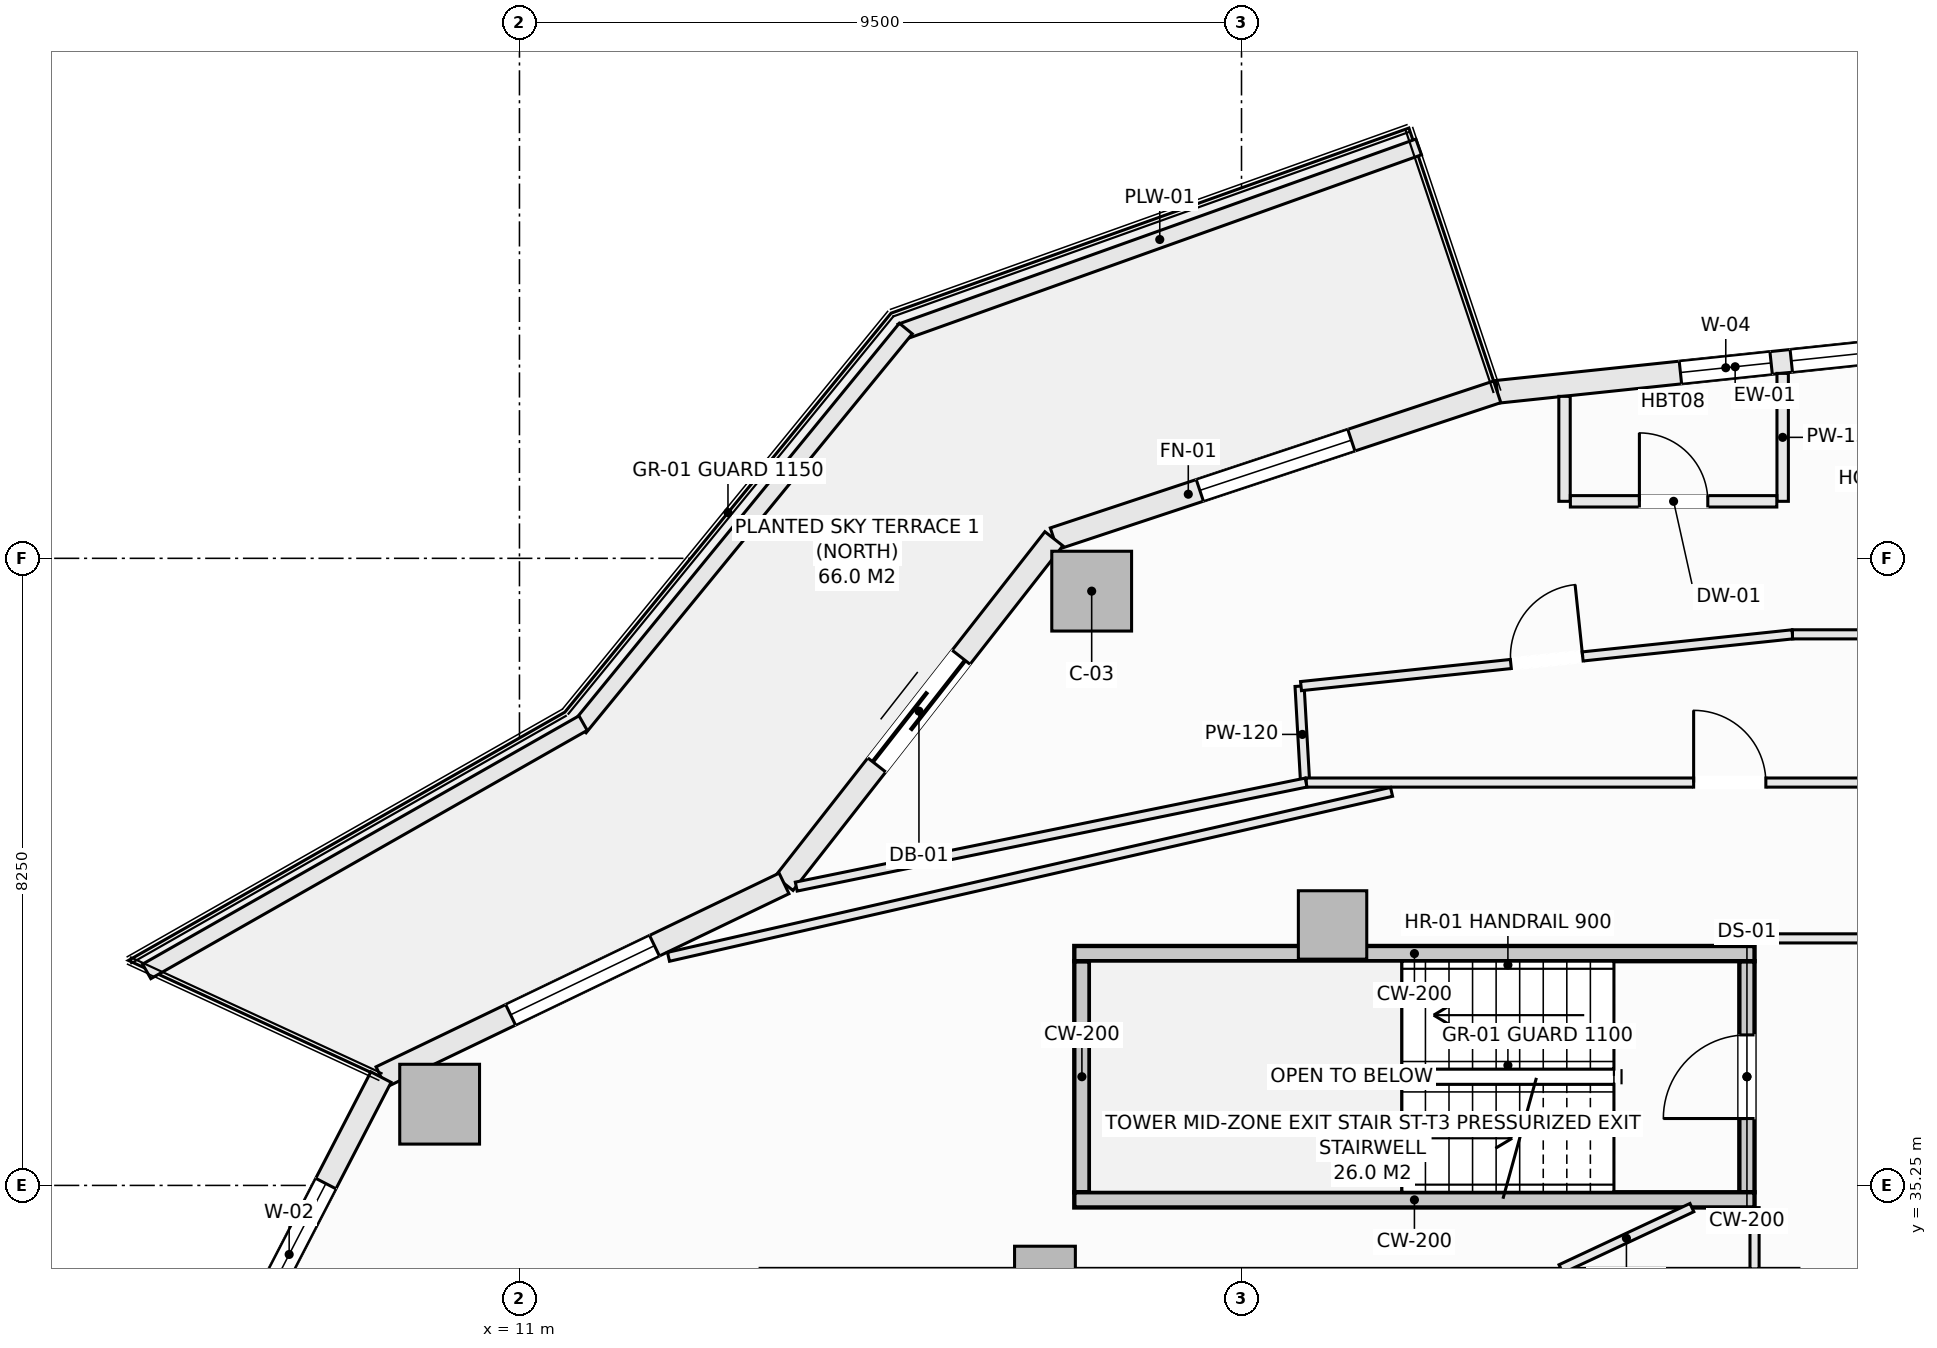
"""IFC4 building model, lengths in metres.
Left out: names, types, materials, properties, quantities, classifications, styles, units other than length and angle.
Written with IfcOpenShell. Run it as: python <this file> out.ifc"""

import sys

from ifc_helpers import new_model, si_unit, direction, frame, frame_2d, origin, origin_2d, place, context, subcontext, project, spatial, rectangle, extrude, element, fill, save


model = new_model("IFC4")
c1 = context("Model", 3, precision=1e-05, world=origin(), true_north=direction((0.0, 1.0)))
c2 = subcontext(c1, "Body", "Model", "MODEL_VIEW")
j1 = project(units=[si_unit("LENGTHUNIT", "METRE"), si_unit("PLANEANGLEUNIT", "RADIAN")], contexts=[c1])
p1 = place(None, origin())
s1 = spatial("IfcSite", under=j1, at=p1, CompositionType="ELEMENT")
p2 = place(p1, origin())
s2 = spatial("IfcBuilding", under=s1, at=p2, CompositionType="ELEMENT")
p3 = place(p2, frame((0.0, 0.0, 118.9)))
s3 = spatial("IfcBuildingStorey", under=s2, at=p3, CompositionType="ELEMENT", Elevation=118.9)
for number, where, z_axis, x_axis in (
    (1, (18.529, 43.068, -0.27), (0.0, 0.0, 1.0), (1.0, 0.0, 0.0)),
    (2, (9.95, 36.319, -0.27), (0.0, 0.0, 1.0), (1.0, 0.0, 0.0)),
):
    element("IfcColumn", number, at=place(p3, frame(where, z_axis=z_axis, x_axis=x_axis)), inside=s3, PredefinedType="COLUMN", context=c2, shape_type="SweptSolid", body=[
        extrude(rectangle(XDim=1.05, YDim=1.05, at=origin_2d()), origin(), (0.0, 0.0, 1.0), 3.4),
    ])
p4 = place(p3, frame((21.698, 38.677, -0.27), z_axis=(0.0, 0.0, 1.0), x_axis=(1.0, 0.0, 0.0)))
e3 = element("IfcColumn", 3, at=p4, inside=s3, PredefinedType="COLUMN", context=c2, shape_type="SweptSolid", body=[
    extrude(rectangle(XDim=0.9, YDim=0.9, at=origin_2d()), origin(), (0.0, 0.0, 1.0), 3.4),
])
p5 = place(p3, frame((17.914, 34.05, -0.27), z_axis=(0.0, 0.0, 1.0), x_axis=(1.0, 0.0, 0.0)))
e4 = element("IfcColumn", 4, at=p5, inside=s3, PredefinedType="PILASTER", context=c2, shape_type="SweptSolid", body=[
    extrude(rectangle(XDim=0.8, YDim=0.8, at=origin_2d()), origin(), (0.0, 0.0, 1.0), 3.4),
])
p6 = place(p3, frame((23.865, 45.691, 0.0), z_axis=(0.0, 0.0, 1.0), x_axis=(0.994498012394, 0.104755445421, 0.0)))
e5 = element("IfcWall", 5, at=p6, inside=s3, PredefinedType="SOLIDWALL", context=c2, shape_type="SweptSolid", body=[
    extrude(rectangle(XDim=6.295, YDim=0.3, at=frame_2d((3.147, 0.0))), origin(), (0.0, 0.0, 1.0), 2.653),
])
p7 = place(p6, frame((2.423, 0.0, 0.74)))
e6 = element("IfcOpeningElement", 6, at=p7, cuts=e5, PredefinedType="OPENING", context=c2, shape_type="SweptSolid", body=[
    extrude(rectangle(XDim=1.2, YDim=1.7, at=frame_2d((0.6, 0.85))), frame((0.0, 0.16, 0.0), z_axis=(0.0, -1.0, 0.0), x_axis=(1.0, 0.0, 0.0)), (0.0, 0.0, 1.0), 0.32),
])
p8 = place(p6, frame((3.89, 0.0, 0.74)))
e7 = element("IfcOpeningElement", 7, at=p8, cuts=e5, PredefinedType="OPENING", context=c2, shape_type="SweptSolid", body=[
    extrude(rectangle(XDim=1.2, YDim=1.7, at=frame_2d((0.6, 0.85))), frame((0.0, 0.16, 0.0), z_axis=(0.0, -1.0, 0.0), x_axis=(1.0, 0.0, 0.0)), (0.0, 0.0, 1.0), 0.32),
])
p9 = place(p3, frame((18.031, 43.758, 0.0), z_axis=(0.0, 0.0, 1.0), x_axis=(0.949238009374, 0.314558741032, 0.0)))
e8 = element("IfcWall", 8, at=p9, inside=s3, PredefinedType="SOLIDWALL", context=c2, shape_type="SweptSolid", body=[
    extrude(rectangle(XDim=6.146, YDim=0.3, at=frame_2d((3.073, 0.0))), origin(), (0.0, 0.0, 1.0), 2.653),
])
p10 = place(p9, frame((2.023, 0.0, 0.74)))
e9 = element("IfcOpeningElement", 9, at=p10, cuts=e8, PredefinedType="OPENING", context=c2, shape_type="SweptSolid", body=[
    extrude(rectangle(XDim=2.1, YDim=1.7, at=frame_2d((1.05, 0.85))), frame((0.0, 0.16, 0.0), z_axis=(0.0, -1.0, 0.0), x_axis=(1.0, 0.0, 0.0)), (0.0, 0.0, 1.0), 0.32),
])
p11 = place(p3, frame((14.481, 39.223, 0.0), z_axis=(0.0, 0.0, 1.0), x_axis=(0.616435134162, 0.787405693001, 0.0)))
e10 = element("IfcWall", 10, at=p11, inside=s3, PredefinedType="SOLIDWALL", context=c2, shape_type="SweptSolid", body=[
    extrude(rectangle(XDim=5.759, YDim=0.3, at=frame_2d((2.879, 0.0))), origin(), (0.0, 0.0, 1.0), 2.653),
])
p12 = place(p11, frame((1.979, 0.0, 0.0)))
e11 = element("IfcOpeningElement", 11, at=p12, cuts=e10, PredefinedType="OPENING", context=c2, shape_type="SweptSolid", body=[
    extrude(rectangle(XDim=1.8, YDim=2.25, at=frame_2d((0.9, 1.125))), frame((0.0, 0.16, 0.0), z_axis=(0.0, -1.0, 0.0), x_axis=(1.0, 0.0, 0.0)), (0.0, 0.0, 1.0), 0.32),
])
p13 = place(p3, frame((9.178, 36.675, 0.0), z_axis=(0.0, 0.0, 1.0), x_axis=(0.901370184739, 0.433049408339, 0.0)))
e12 = element("IfcWall", 12, at=p13, inside=s3, PredefinedType="SOLIDWALL", context=c2, shape_type="SweptSolid", body=[
    extrude(rectangle(XDim=5.884, YDim=0.3, at=frame_2d((2.942, 0.0))), origin(), (0.0, 0.0, 1.0), 2.653),
])
p14 = place(p13, frame((1.892, 0.0, 0.74)))
e13 = element("IfcOpeningElement", 13, at=p14, cuts=e12, PredefinedType="OPENING", context=c2, shape_type="SweptSolid", body=[
    extrude(rectangle(XDim=2.1, YDim=1.7, at=frame_2d((1.05, 0.85))), frame((0.0, 0.16, 0.0), z_axis=(0.0, -1.0, 0.0), x_axis=(1.0, 0.0, 0.0)), (0.0, 0.0, 1.0), 0.32),
])
p15 = place(p3, frame((6.762, 32.008, 0.0), z_axis=(0.0, 0.0, 1.0), x_axis=(0.459767899643, 0.888039119892, 0.0)))
e14 = element("IfcWall", 14, at=p15, inside=s3, PredefinedType="SOLIDWALL", context=c2, shape_type="SweptSolid", body=[
    extrude(rectangle(XDim=5.255, YDim=0.3, at=frame_2d((2.628, 0.0))), origin(), (0.0, 0.0, 1.0), 2.653),
])
p16 = place(p15, frame((1.578, 0.0, 0.74)))
e15 = element("IfcOpeningElement", 15, at=p16, cuts=e14, PredefinedType="OPENING", context=c2, shape_type="SweptSolid", body=[
    extrude(rectangle(XDim=2.1, YDim=1.7, at=frame_2d((1.05, 0.85))), frame((0.0, 0.16, 0.0), z_axis=(0.0, -1.0, 0.0), x_axis=(1.0, 0.0, 0.0)), (0.0, 0.0, 1.0), 0.32),
])
p17 = place(p3, frame((16.018, 46.477, 0.0), z_axis=(0.0, 0.0, 1.0), x_axis=(0.941628873241, 0.336652736627, 0.0)))
e16 = element("IfcWall", 16, at=p17, inside=s3, PredefinedType="PARAPET", context=c2, shape_type="SweptSolid", body=[
    extrude(rectangle(XDim=7.235, YDim=0.22, at=frame_2d((3.618, 0.0))), origin(), (0.0, 0.0, 1.0), 0.52),
])
p18 = place(p3, frame((11.791, 41.274, 0.0), z_axis=(0.0, 0.0, 1.0), x_axis=(0.633024046468, 0.774132131224, 0.0)))
e17 = element("IfcWall", 17, at=p18, inside=s3, PredefinedType="PARAPET", context=c2, shape_type="SweptSolid", body=[
    extrude(rectangle(XDim=6.781, YDim=0.22, at=frame_2d((3.39, 0.0))), origin(), (0.0, 0.0, 1.0), 0.52),
])
p19 = place(p3, frame((6.095, 38.066, 0.0), z_axis=(0.0, 0.0, 1.0), x_axis=(0.869187658335, 0.494482370361, 0.0)))
e18 = element("IfcWall", 18, at=p19, inside=s3, PredefinedType="PARAPET", context=c2, shape_type="SweptSolid", body=[
    extrude(rectangle(XDim=6.606, YDim=0.22, at=frame_2d((3.303, 0.0))), origin(), (0.0, 0.0, 1.0), 0.52),
])
p20 = place(p3, frame((27.15, 35.16, -0.27), z_axis=(0.0, 0.0, 1.0), x_axis=(0.0, 1.0, 0.0)))
e19 = element("IfcWall", 19, at=p20, inside=s3, PredefinedType="SHEAR", context=c2, shape_type="SweptSolid", body=[
    extrude(rectangle(XDim=3.04, YDim=0.2, at=frame_2d((1.52, 0.0))), origin(), (0.0, 0.0, 1.0), 3.4),
])
p21 = place(p20, frame((0.97, 0.0, 0.27)))
e20 = element("IfcOpeningElement", 20, at=p21, cuts=e19, PredefinedType="OPENING", context=c2, shape_type="SweptSolid", body=[
    extrude(rectangle(XDim=1.1, YDim=2.15, at=frame_2d((0.55, 1.075))), frame((0.0, 0.11, 0.0), z_axis=(0.0, -1.0, 0.0), x_axis=(1.0, 0.0, 0.0)), (0.0, 0.0, 1.0), 0.22),
])
p22 = place(p3, frame((18.4, 35.16, -0.27), z_axis=(0.0, 0.0, 1.0), x_axis=(0.0, 1.0, 0.0)))
e21 = element("IfcWall", 21, at=p22, inside=s3, PredefinedType="SHEAR", context=c2, shape_type="SweptSolid", body=[
    extrude(rectangle(XDim=3.04, YDim=0.2, at=frame_2d((1.52, 0.0))), origin(), (0.0, 0.0, 1.0), 3.4),
])
for number, where, z_axis, x_axis in (
    (22, (18.3, 38.3, -0.27), (0.0, 0.0, 1.0), (1.0, 0.0, 0.0)),
    (23, (18.3, 35.06, -0.27), (0.0, 0.0, 1.0), (1.0, 0.0, 0.0)),
):
    element("IfcWall", number, at=place(p3, frame(where, z_axis=z_axis, x_axis=x_axis)), inside=s3, PredefinedType="SHEAR", context=c2, shape_type="SweptSolid", body=[
        extrude(rectangle(XDim=8.95, YDim=0.2, at=frame_2d((4.475, 0.0))), origin(), (0.0, 0.0, 1.0), 3.4),
    ])
p23 = place(p3, frame((27.62, 44.25, 0.0), z_axis=(0.0, 0.0, 1.0), x_axis=(0.0, 1.0, 0.0)))
e24 = element("IfcWall", 24, at=p23, inside=s3, PredefinedType="PARTITIONING", context=c2, shape_type="SweptSolid", body=[
    extrude(rectangle(XDim=1.683, YDim=0.15, at=frame_2d((0.842, 0.0))), origin(), (0.0, 0.0, 1.0), 3.13),
])
p24 = place(p3, frame((21.264, 41.818, 0.0), z_axis=(0.0, 0.0, 1.0), x_axis=(0.0574492264, -0.99834842935, 0.0)))
e25 = element("IfcWall", 25, at=p24, inside=s3, PredefinedType="PARTITIONING", context=c2, shape_type="SweptSolid", body=[
    extrude(rectangle(XDim=1.271, YDim=0.12, at=frame_2d((0.635, 0.0))), origin(), (0.0, 0.0, 1.0), 3.13),
])
p25 = place(p3, frame((27.25, 34.152, 0.0), z_axis=(0.0, 0.0, 1.0), x_axis=(0.0, 1.0, 0.0)))
e26 = element("IfcWall", 26, at=p25, inside=s3, PredefinedType="PARTITIONING", context=c2, shape_type="SweptSolid", body=[
    extrude(rectangle(XDim=0.806, YDim=0.12, at=frame_2d((0.403, 0.0))), origin(), (0.0, 0.0, 1.0), 3.13),
])
p26 = place(p3, frame((27.25, 38.5, 0.0), z_axis=(0.0, 0.0, 1.0), x_axis=(1.0, 0.0, 0.0)))
e27 = element("IfcWall", 27, at=p26, inside=s3, PredefinedType="PARTITIONING", context=c2, shape_type="SweptSolid", body=[
    extrude(rectangle(XDim=2.53, YDim=0.12, at=frame_2d((1.265, 0.0))), origin(), (0.0, 0.0, 1.0), 3.13),
])
p27 = place(p3, frame((21.351, 40.55, 0.0), z_axis=(0.0, 0.0, 1.0), x_axis=(1.0, 0.0, 0.0)))
e28 = element("IfcWall", 28, at=p27, inside=s3, PredefinedType="PARTITIONING", context=c2, shape_type="SweptSolid", body=[
    extrude(rectangle(XDim=10.737, YDim=0.12, at=frame_2d((5.369, 0.0))), origin(), (0.0, 0.0, 1.0), 3.13),
])
p28 = place(p27, frame((5.098, 0.0, 0.0)))
e29 = element("IfcOpeningElement", 29, at=p28, cuts=e28, PredefinedType="OPENING", context=c2, shape_type="SweptSolid", body=[
    extrude(rectangle(XDim=0.95, YDim=2.1, at=frame_2d((0.475, 1.05))), frame((0.0, 0.07, 0.0), z_axis=(0.0, -1.0, 0.0), x_axis=(1.0, 0.0, 0.0)), (0.0, 0.0, 1.0), 0.14),
])
p29 = place(p3, frame((21.283, 41.819, 0.0), z_axis=(0.0, 0.0, 1.0), x_axis=(0.994501131299, 0.104725831799, 0.0)))
e30 = element("IfcWall", 30, at=p29, inside=s3, PredefinedType="PARTITIONING", context=c2, shape_type="SweptSolid", body=[
    extrude(rectangle(XDim=6.502, YDim=0.12, at=frame_2d((3.251, 0.0))), origin(), (0.0, 0.0, 1.0), 3.13),
])
p30 = place(p29, frame((2.776, 0.0, 0.0)))
e31 = element("IfcOpeningElement", 31, at=p30, cuts=e30, PredefinedType="OPENING", context=c2, shape_type="SweptSolid", body=[
    extrude(rectangle(XDim=0.95, YDim=2.1, at=frame_2d((0.475, 1.05))), frame((0.0, 0.07, 0.0), z_axis=(0.0, -1.0, 0.0), x_axis=(1.0, 0.0, 0.0)), (0.0, 0.0, 1.0), 0.14),
])
p31 = place(p3, frame((27.749, 42.5, 0.0), z_axis=(0.0, 0.0, 1.0), x_axis=(1.0, 0.0, 0.0)))
e32 = element("IfcWall", 32, at=p31, inside=s3, PredefinedType="PARTITIONING", context=c2, shape_type="SweptSolid", body=[
    extrude(rectangle(XDim=4.752, YDim=0.12, at=frame_2d((2.376, 0.0))), origin(), (0.0, 0.0, 1.0), 3.13),
])
p32 = place(p3, frame((24.703, 34.152, 0.0), z_axis=(0.0, 0.0, 1.0), x_axis=(0.90580239241, 0.423700396393, 0.0)))
e33 = element("IfcWall", 33, at=p32, inside=s3, PredefinedType="PARTITIONING", context=c2, shape_type="SweptSolid", body=[
    extrude(rectangle(XDim=1.902, YDim=0.12, at=frame_2d((0.951, 0.0))), origin(), (0.0, 0.0, 1.0), 3.13),
])
p33 = place(p3, frame((24.75, 44.25, 0.0), z_axis=(0.0, 0.0, 1.0), x_axis=(0.0, 1.0, 0.0)))
e34 = element("IfcWall", 34, at=p33, inside=s3, PredefinedType="PARTITIONING", context=c2, shape_type="SweptSolid", body=[
    extrude(rectangle(XDim=1.381, YDim=0.15, at=frame_2d((0.69, 0.0))), origin(), (0.0, 0.0, 1.0), 3.13),
])
p34 = place(p3, frame((24.827, 44.25, 0.0), z_axis=(0.0, 0.0, 1.0), x_axis=(1.0, 0.0, 0.0)))
e35 = element("IfcWall", 35, at=p34, inside=s3, PredefinedType="PARTITIONING", context=c2, shape_type="SweptSolid", body=[
    extrude(rectangle(XDim=2.716, YDim=0.15, at=frame_2d((1.358, 0.0))), origin(), (0.0, 0.0, 1.0), 2.653),
])
p35 = place(p34, frame((0.908, 0.0, 0.0)))
e36 = element("IfcOpeningElement", 36, at=p35, cuts=e35, PredefinedType="OPENING", context=c2, shape_type="SweptSolid", body=[
    extrude(rectangle(XDim=0.9, YDim=2.1, at=frame_2d((0.45, 1.05))), frame((0.0, 0.085, 0.0), z_axis=(0.0, -1.0, 0.0), x_axis=(1.0, 0.0, 0.0)), (0.0, 0.0, 1.0), 0.17),
])
p36 = place(p3, frame((12.961, 38.257, 0.0), z_axis=(0.0, 0.0, 1.0), x_axis=(0.974943994821, 0.222450459567, 0.0)))
e37 = element("IfcWall", 37, at=p36, inside=s3, PredefinedType="PARTITIONING", context=c2, shape_type="SweptSolid", body=[
    extrude(rectangle(XDim=9.758, YDim=0.12, at=frame_2d((4.879, 0.0))), origin(), (0.0, 0.0, 1.0), 3.13),
])
p37 = place(p3, frame((14.642, 39.181, 0.0), z_axis=(0.0, 0.0, 1.0), x_axis=(0.979813468357, 0.199913899534, 0.0)))
e38 = element("IfcWall", 38, at=p37, inside=s3, PredefinedType="PARTITIONING", context=c2, shape_type="SweptSolid", body=[
    extrude(rectangle(XDim=6.846, YDim=0.12, at=frame_2d((3.423, 0.0))), origin(), (0.0, 0.0, 1.0), 3.13),
])
p38 = place(p7, origin())
e39 = element("IfcWindow", 39, at=p38, inside=s3, PartitioningType="SINGLE_PANEL", PredefinedType="WINDOW", context=c2, shape_type="SweptSolid", body=[
    extrude(rectangle(XDim=1.2, YDim=1.7, at=frame_2d((0.6, 0.85))), frame((0.0, 0.03, 0.0), z_axis=(0.0, -1.0, 0.0), x_axis=(1.0, 0.0, 0.0)), (0.0, 0.0, 1.0), 0.06),
])
fill(e6, e39)
p39 = place(p10, origin())
e40 = element("IfcWindow", 40, at=p39, inside=s3, PartitioningType="SINGLE_PANEL", PredefinedType="WINDOW", context=c2, shape_type="SweptSolid", body=[
    extrude(rectangle(XDim=2.1, YDim=1.7, at=frame_2d((1.05, 0.85))), frame((0.0, 0.03, 0.0), z_axis=(0.0, -1.0, 0.0), x_axis=(1.0, 0.0, 0.0)), (0.0, 0.0, 1.0), 0.06),
])
fill(e9, e40)
p40 = place(p12, origin())
e41 = element("IfcDoor", 41, at=p40, inside=s3, OperationType="SLIDING_TO_LEFT", PredefinedType="DOOR", context=c2, shape_type="SweptSolid", body=[
    extrude(rectangle(XDim=1.8, YDim=2.25, at=frame_2d((0.9, 1.125))), frame((0.0, 0.025, 0.0), z_axis=(0.0, -1.0, 0.0), x_axis=(1.0, 0.0, 0.0)), (0.0, 0.0, 1.0), 0.05),
])
fill(e11, e41)
p41 = place(p14, origin())
e42 = element("IfcWindow", 42, at=p41, inside=s3, PartitioningType="SINGLE_PANEL", PredefinedType="WINDOW", context=c2, shape_type="SweptSolid", body=[
    extrude(rectangle(XDim=2.1, YDim=1.7, at=frame_2d((1.05, 0.85))), frame((0.0, 0.03, 0.0), z_axis=(0.0, -1.0, 0.0), x_axis=(1.0, 0.0, 0.0)), (0.0, 0.0, 1.0), 0.06),
])
fill(e13, e42)
p42 = place(p16, origin())
e43 = element("IfcWindow", 43, at=p42, inside=s3, PartitioningType="SINGLE_PANEL", PredefinedType="WINDOW", context=c2, shape_type="SweptSolid", body=[
    extrude(rectangle(XDim=2.1, YDim=1.7, at=frame_2d((1.05, 0.85))), frame((0.0, 0.03, 0.0), z_axis=(0.0, -1.0, 0.0), x_axis=(1.0, 0.0, 0.0)), (0.0, 0.0, 1.0), 0.06),
])
fill(e15, e43)
p43 = place(p21, origin())
e44 = element("IfcDoor", 44, at=p43, inside=s3, OperationType="SINGLE_SWING_LEFT", PredefinedType="DOOR", context=c2, shape_type="SweptSolid", body=[
    extrude(rectangle(XDim=1.1, YDim=2.15, at=frame_2d((0.55, 1.075))), frame((0.0, 0.025, 0.0), z_axis=(0.0, -1.0, 0.0), x_axis=(1.0, 0.0, 0.0)), (0.0, 0.0, 1.0), 0.05),
])
fill(e20, e44)
p44 = place(p30, origin())
e45 = element("IfcDoor", 45, at=p44, inside=s3, OperationType="SINGLE_SWING_RIGHT", PredefinedType="DOOR", context=c2, shape_type="SweptSolid", body=[
    extrude(rectangle(XDim=0.95, YDim=2.1, at=frame_2d((0.475, 1.05))), frame((0.0, 0.025, 0.0), z_axis=(0.0, -1.0, 0.0), x_axis=(1.0, 0.0, 0.0)), (0.0, 0.0, 1.0), 0.05),
])
fill(e31, e45)
p45 = place(p28, origin())
e46 = element("IfcDoor", 46, at=p45, inside=s3, OperationType="SINGLE_SWING_LEFT", PredefinedType="DOOR", context=c2, shape_type="SweptSolid", body=[
    extrude(rectangle(XDim=0.95, YDim=2.1, at=frame_2d((0.475, 1.05))), frame((0.0, 0.025, 0.0), z_axis=(0.0, -1.0, 0.0), x_axis=(1.0, 0.0, 0.0)), (0.0, 0.0, 1.0), 0.05),
])
fill(e29, e46)
p46 = place(p35, origin())
e47 = element("IfcDoor", 47, at=p46, inside=s3, OperationType="SINGLE_SWING_LEFT", PredefinedType="DOOR", context=c2, shape_type="SweptSolid", body=[
    extrude(rectangle(XDim=0.9, YDim=2.1, at=frame_2d((0.45, 1.05))), frame((0.0, 0.025, 0.0), z_axis=(0.0, -1.0, 0.0), x_axis=(1.0, 0.0, 0.0)), (0.0, 0.0, 1.0), 0.05),
])
fill(e36, e47)
p47 = place(p8, origin())
e48 = element("IfcWindow", 48, at=p47, inside=s3, PartitioningType="SINGLE_PANEL", PredefinedType="WINDOW", context=c2, shape_type="SweptSolid", body=[
    extrude(rectangle(XDim=1.2, YDim=1.7, at=frame_2d((0.6, 0.85))), frame((0.0, 0.03, 0.0), z_axis=(0.0, -1.0, 0.0), x_axis=(1.0, 0.0, 0.0)), (0.0, 0.0, 1.0), 0.06),
])
fill(e7, e48)
save(model, sys.argv[1])
